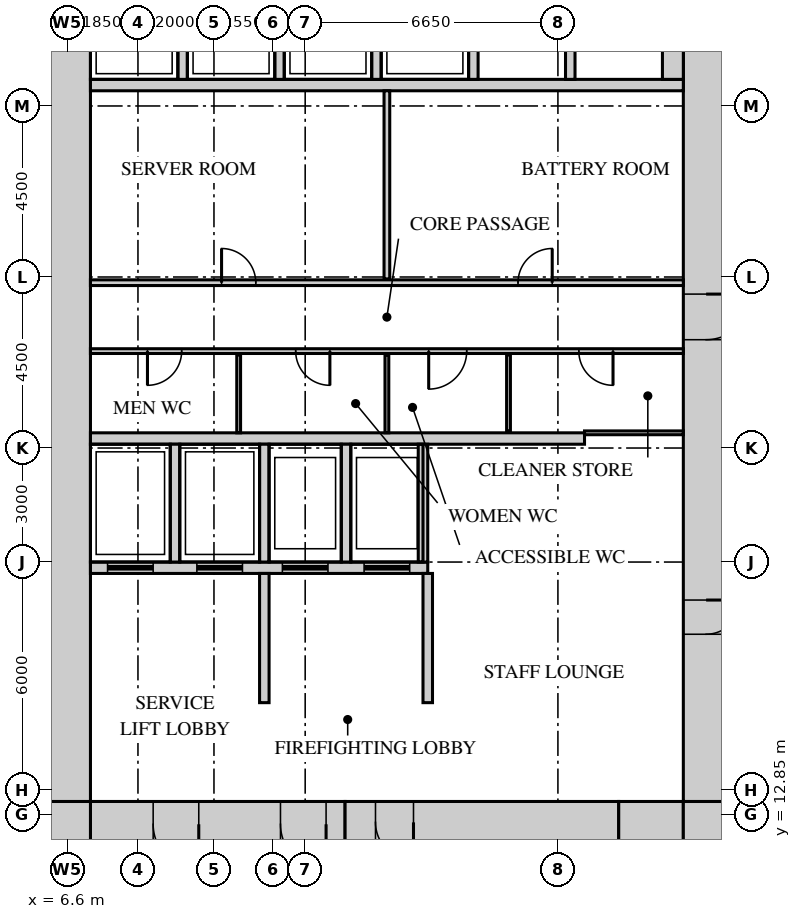
"""IFC4 building model, lengths in metres.
Left out: names, types, materials, properties, quantities, classifications, styles, units other than length and angle.
Written with IfcOpenShell. Run it as: python <this file> out.ifc"""

import sys

from ifc_helpers import new_model, si_unit, direction, frame, frame_2d, origin, place, context, subcontext, project, spatial, rectangle, extrude, source, transform, mapped, element, fill, save


model = new_model("IFC4")
c1 = context("Model", 3, precision=1e-05, world=origin(), true_north=direction((0.0, 1.0)))
c2 = subcontext(c1, "Body", "Model", "MODEL_VIEW")
j1 = project(units=[si_unit("LENGTHUNIT", "METRE"), si_unit("PLANEANGLEUNIT", "RADIAN")], contexts=[c1])
p1 = place(None, origin())
s1 = spatial("IfcSite", under=j1, at=p1, CompositionType="ELEMENT")
p2 = place(p1, origin())
s2 = spatial("IfcBuilding", under=s1, at=p2, CompositionType="ELEMENT")
p3 = place(p2, frame((0.0, 0.0, 13.0)))
s3 = spatial("IfcBuildingStorey", under=s2, at=p3, CompositionType="ELEMENT", Elevation=13.0)
m1 = source(origin(), c2, "Body", "SweptSolid", [
    extrude(rectangle(XDim=6.7, YDim=1.2, at=frame_2d((3.35, 0.0))), origin(), (0.0, 0.0, 1.0), 5.2),
])
p4 = place(p3, frame((7.2, 12.6, 0.0), z_axis=(0.0, 0.0, 1.0), x_axis=(1.0, 0.0, 0.0)))
e1 = element("IfcWall", 1, at=p4, inside=s3, PredefinedType="SHEAR", context=c2, shape_type="MappedRepresentation", body=[
    mapped(m1, transform((0.0, 0.0, 0.0))),
])
m2 = source(origin(), c2, "Body", "SweptSolid", [
    extrude(rectangle(XDim=1.2, YDim=2.1, at=frame_2d((0.6, 1.05))), frame((0.0, 0.61, 0.0), z_axis=(0.0, -1.0, 0.0), x_axis=(1.0, 0.0, 0.0)), (0.0, 0.0, 1.0), 1.22),
])
p5 = place(p4, frame((5.0, 0.0, 0.0)))
e2 = element("IfcOpeningElement", 2, at=p5, cuts=e1, PredefinedType="OPENING", context=c2, shape_type="MappedRepresentation", body=[
    mapped(m2, transform((0.0, 0.0, 0.0))),
])
p6 = place(p4, frame((1.65, 0.0, 0.0)))
e3 = element("IfcOpeningElement", 3, at=p6, cuts=e1, PredefinedType="OPENING", context=c2, shape_type="MappedRepresentation", body=[
    mapped(m2, transform((0.0, 0.0, 0.0))),
])
m3 = source(origin(), c2, "Body", "SweptSolid", [
    extrude(rectangle(XDim=7.2, YDim=1.1, at=frame_2d((3.6, 0.0))), origin(), (0.0, 0.0, 1.0), 5.2),
])
p7 = place(p3, frame((13.9, 12.65, 0.0), z_axis=(0.0, 0.0, 1.0), x_axis=(1.0, 0.0, 0.0)))
e4 = element("IfcWall", 4, at=p7, inside=s3, PredefinedType="SHEAR", context=c2, shape_type="MappedRepresentation", body=[
    mapped(m3, transform((0.0, 0.0, 0.0))),
])
m4 = source(origin(), c2, "Body", "SweptSolid", [
    extrude(rectangle(XDim=1.0, YDim=2.1, at=frame_2d((0.5, 1.05))), frame((0.0, 0.56, 0.0), z_axis=(0.0, -1.0, 0.0), x_axis=(1.0, 0.0, 0.0)), (0.0, 0.0, 1.0), 1.12),
])
p8 = place(p7, frame((0.8, 0.0, 0.0)))
e5 = element("IfcOpeningElement", 5, at=p8, cuts=e4, PredefinedType="OPENING", context=c2, shape_type="MappedRepresentation", body=[
    mapped(m4, transform((0.0, 0.0, 0.0))),
])
m5 = source(origin(), c2, "Body", "SweptSolid", [
    extrude(rectangle(XDim=1.7, YDim=1.2, at=frame_2d((0.85, 0.0))), origin(), (0.0, 0.0, 1.0), 5.2),
])
p9 = place(p3, frame((21.1, 12.6, 0.0), z_axis=(0.0, 0.0, 1.0), x_axis=(1.0, 0.0, 0.0)))
e6 = element("IfcWall", 6, at=p9, inside=s3, PredefinedType="SHEAR", context=c2, shape_type="MappedRepresentation", body=[
    mapped(m5, transform((0.0, 0.0, 0.0))),
])
m6 = source(origin(), c2, "Body", "SweptSolid", [
    extrude(rectangle(XDim=1.2, YDim=1.2, at=frame_2d((0.6, 0.0))), origin(), (0.0, 0.0, 1.0), 5.2),
])
for number, where, z_axis, x_axis in (
    (7, (22.8, 12.6, 0.0), (0.0, 0.0, 1.0), (1.0, 0.0, 0.0)),
    (8, (6.0, 12.6, 0.0), (0.0, 0.0, 1.0), (1.0, 0.0, 0.0)),
):
    element("IfcWall", number, at=place(p3, frame(where, z_axis=z_axis, x_axis=x_axis)), inside=s3, PredefinedType="SHEAR", context=c2, shape_type="MappedRepresentation", body=[
        mapped(m6, transform((0.0, 0.0, 0.0))),
    ])
m7 = source(origin(), c2, "Body", "SweptSolid", [
    extrude(rectangle(XDim=27.6, YDim=1.2, at=frame_2d((13.8, 0.0))), origin(), (0.0, 0.0, 1.0), 5.2),
])
p10 = place(p3, frame((23.4, 13.2, 0.0), z_axis=(0.0, 0.0, 1.0), x_axis=(0.0, 1.0, 0.0)))
e9 = element("IfcWall", 9, at=p10, inside=s3, PredefinedType="SHEAR", context=c2, shape_type="MappedRepresentation", body=[
    mapped(m7, transform((0.0, 0.0, 0.0))),
])
m8 = source(origin(), c2, "Body", "SweptSolid", [
    extrude(rectangle(XDim=1.8, YDim=2.1, at=frame_2d((0.9, 1.05))), frame((0.0, 0.61, 0.0), z_axis=(0.0, -1.0, 0.0), x_axis=(1.0, 0.0, 0.0)), (0.0, 0.0, 1.0), 1.22),
])
p11 = place(p10, frame((22.4, 0.0, 0.0)))
e10 = element("IfcOpeningElement", 10, at=p11, cuts=e9, PredefinedType="OPENING", context=c2, shape_type="MappedRepresentation", body=[
    mapped(m8, transform((0.0, 0.0, 0.0))),
])
p12 = place(p10, frame((12.15, 0.0, 0.0)))
e11 = element("IfcOpeningElement", 11, at=p12, cuts=e9, PredefinedType="OPENING", context=c2, shape_type="MappedRepresentation", body=[
    mapped(m2, transform((0.0, 0.0, 0.0))),
])
m9 = source(origin(), c2, "Body", "SweptSolid", [
    extrude(rectangle(XDim=0.9, YDim=2.1, at=frame_2d((0.45, 1.05))), frame((0.0, 0.61, 0.0), z_axis=(0.0, -1.0, 0.0), x_axis=(1.0, 0.0, 0.0)), (0.0, 0.0, 1.0), 1.22),
])
p13 = place(p10, frame((4.4, 0.0, 0.0)))
e12 = element("IfcOpeningElement", 12, at=p13, cuts=e9, PredefinedType="OPENING", context=c2, shape_type="MappedRepresentation", body=[
    mapped(m9, transform((0.0, 0.0, 0.0))),
])
p14 = place(p3, frame((6.6, 13.2, 0.0), z_axis=(0.0, 0.0, 1.0), x_axis=(0.0, 1.0, 0.0)))
e13 = element("IfcWall", 13, at=p14, inside=s3, PredefinedType="SHEAR", context=c2, shape_type="MappedRepresentation", body=[
    mapped(m7, transform((0.0, 0.0, 0.0))),
])
m10 = source(origin(), c2, "Body", "SweptSolid", [
    extrude(rectangle(XDim=13.0, YDim=0.3, at=frame_2d((6.5, 0.0))), origin(), (0.0, 0.0, 1.0), 5.2),
])
p15 = place(p3, frame((7.2, 22.75, 0.0), z_axis=(0.0, 0.0, 1.0), x_axis=(1.0, 0.0, 0.0)))
e14 = element("IfcWall", 14, at=p15, inside=s3, PredefinedType="STANDARD", context=c2, shape_type="MappedRepresentation", body=[
    mapped(m10, transform((0.0, 0.0, 0.0))),
])
m11 = source(origin(), c2, "Body", "SweptSolid", [
    extrude(rectangle(XDim=8.875, YDim=0.3, at=frame_2d((4.438, 0.0))), origin(), (0.0, 0.0, 1.0), 5.2),
])
p16 = place(p3, frame((7.2, 19.35, 0.0), z_axis=(0.0, 0.0, 1.0), x_axis=(1.0, 0.0, 0.0)))
e15 = element("IfcWall", 15, at=p16, inside=s3, PredefinedType="STANDARD", context=c2, shape_type="MappedRepresentation", body=[
    mapped(m11, transform((0.0, 0.0, 0.0))),
])
m12 = source(origin(), c2, "Body", "SweptSolid", [
    extrude(rectangle(XDim=1.2, YDim=2.1, at=frame_2d((0.6, 1.05))), frame((0.0, 0.16, 0.0), z_axis=(0.0, -1.0, 0.0), x_axis=(1.0, 0.0, 0.0)), (0.0, 0.0, 1.0), 0.32),
])
p17 = place(p16, frame((0.45, 0.0, 0.0)))
e16 = element("IfcOpeningElement", 16, at=p17, cuts=e15, PredefinedType="OPENING", context=c2, shape_type="MappedRepresentation", body=[
    mapped(m12, transform((0.0, 0.0, 0.0))),
])
p18 = place(p16, frame((2.8, 0.0, 0.0)))
e17 = element("IfcOpeningElement", 17, at=p18, cuts=e15, PredefinedType="OPENING", context=c2, shape_type="MappedRepresentation", body=[
    mapped(m12, transform((0.0, 0.0, 0.0))),
])
p19 = place(p16, frame((5.05, 0.0, 0.0)))
e18 = element("IfcOpeningElement", 18, at=p19, cuts=e15, PredefinedType="OPENING", context=c2, shape_type="MappedRepresentation", body=[
    mapped(m12, transform((0.0, 0.0, 0.0))),
])
p20 = place(p16, frame((7.2, 0.0, 0.0)))
e19 = element("IfcOpeningElement", 19, at=p20, cuts=e15, PredefinedType="OPENING", context=c2, shape_type="MappedRepresentation", body=[
    mapped(m12, transform((0.0, 0.0, 0.0))),
])
m13 = source(origin(), c2, "Body", "SweptSolid", [
    extrude(rectangle(XDim=15.6, YDim=0.3, at=frame_2d((7.8, 0.0))), origin(), (0.0, 0.0, 1.0), 5.2),
])
p21 = place(p3, frame((7.2, 32.05, 0.0), z_axis=(0.0, 0.0, 1.0), x_axis=(1.0, 0.0, 0.0)))
e20 = element("IfcWall", 20, at=p21, inside=s3, PredefinedType="STANDARD", context=c2, shape_type="MappedRepresentation", body=[
    mapped(m13, transform((0.0, 0.0, 0.0))),
])
m14 = source(origin(), c2, "Body", "SweptSolid", [
    extrude(rectangle(XDim=3.1, YDim=0.25, at=frame_2d((1.55, 0.0))), origin(), (0.0, 0.0, 1.0), 5.2),
])
for number, where, z_axis, x_axis in (
    (21, (9.425, 19.5, 0.0), (0.0, 0.0, 1.0), (0.0, 1.0, 0.0)),
    (22, (11.775, 19.5, 0.0), (0.0, 0.0, 1.0), (0.0, 1.0, 0.0)),
    (23, (13.925, 19.5, 0.0), (0.0, 0.0, 1.0), (0.0, 1.0, 0.0)),
    (24, (15.95, 19.5, 0.0), (0.0, 0.0, 1.0), (0.0, 1.0, 0.0)),
):
    element("IfcWall", number, at=place(p3, frame(where, z_axis=z_axis, x_axis=x_axis)), inside=s3, PredefinedType="STANDARD", context=c2, shape_type="MappedRepresentation", body=[
        mapped(m14, transform((0.0, 0.0, 0.0))),
    ])
m15 = source(origin(), c2, "Body", "SweptSolid", [
    extrude(rectangle(XDim=2.4, YDim=0.25, at=frame_2d((1.2, 0.0))), origin(), (0.0, 0.0, 1.0), 5.2),
])
for number, where, z_axis, x_axis in (
    (25, (9.625, 32.2, 0.0), (0.0, 0.0, 1.0), (0.0, 1.0, 0.0)),
    (26, (12.175, 32.2, 0.0), (0.0, 0.0, 1.0), (0.0, 1.0, 0.0)),
    (27, (14.725, 32.2, 0.0), (0.0, 0.0, 1.0), (0.0, 1.0, 0.0)),
    (28, (17.275, 32.2, 0.0), (0.0, 0.0, 1.0), (0.0, 1.0, 0.0)),
    (29, (19.825, 32.2, 0.0), (0.0, 0.0, 1.0), (0.0, 1.0, 0.0)),
):
    element("IfcWall", number, at=place(p3, frame(where, z_axis=z_axis, x_axis=x_axis)), inside=s3, PredefinedType="STANDARD", context=c2, shape_type="MappedRepresentation", body=[
        mapped(m15, transform((0.0, 0.0, 0.0))),
    ])
m16 = source(origin(), c2, "Body", "SweptSolid", [
    extrude(rectangle(XDim=2.4, YDim=0.55, at=frame_2d((1.2, 0.0))), origin(), (0.0, 0.0, 1.0), 5.2),
])
p22 = place(p3, frame((22.525, 32.2, 0.0), z_axis=(0.0, 0.0, 1.0), x_axis=(0.0, 1.0, 0.0)))
e30 = element("IfcWall", 30, at=p22, inside=s3, PredefinedType="STANDARD", context=c2, shape_type="MappedRepresentation", body=[
    mapped(m16, transform((0.0, 0.0, 0.0))),
])
m17 = source(origin(), c2, "Body", "SweptSolid", [
    extrude(rectangle(XDim=3.4, YDim=0.25, at=frame_2d((1.7, 0.0))), origin(), (0.0, 0.0, 1.0), 5.2),
])
for number, where, z_axis, x_axis in (
    (31, (16.075, 15.8, 0.0), (0.0, 0.0, 1.0), (0.0, 1.0, 0.0)),
    (32, (11.775, 15.8, 0.0), (0.0, 0.0, 1.0), (0.0, 1.0, 0.0)),
):
    element("IfcWall", number, at=place(p3, frame(where, z_axis=z_axis, x_axis=x_axis)), inside=s3, PredefinedType="STANDARD", context=c2, shape_type="MappedRepresentation", body=[
        mapped(m17, transform((0.0, 0.0, 0.0))),
    ])
m18 = source(origin(), c2, "Body", "SweptSolid", [
    extrude(rectangle(XDim=2.05, YDim=0.1, at=frame_2d((1.025, 0.0))), origin(), (0.0, 0.0, 1.0), 5.2),
])
for number, where, z_axis, x_axis in (
    (33, (11.1, 22.9, 0.0), (0.0, 0.0, 1.0), (0.0, 1.0, 0.0)),
    (34, (15.0, 22.9, 0.0), (0.0, 0.0, 1.0), (0.0, 1.0, 0.0)),
):
    element("IfcWall", number, at=place(p3, frame(where, z_axis=z_axis, x_axis=x_axis)), inside=s3, PredefinedType="PARTITIONING", context=c2, shape_type="MappedRepresentation", body=[
        mapped(m18, transform((0.0, 0.0, 0.0))),
    ])
m19 = source(origin(), c2, "Body", "SweptSolid", [
    extrude(rectangle(XDim=2.6, YDim=0.1, at=frame_2d((1.3, 0.0))), origin(), (0.0, 0.0, 1.0), 5.2),
])
p23 = place(p3, frame((20.2, 22.9, 0.0), z_axis=(0.0, 0.0, 1.0), x_axis=(1.0, 0.0, 0.0)))
e35 = element("IfcWall", 35, at=p23, inside=s3, PredefinedType="PARTITIONING", context=c2, shape_type="MappedRepresentation", body=[
    mapped(m19, transform((0.0, 0.0, 0.0))),
])
m20 = source(origin(), c2, "Body", "SweptSolid", [
    extrude(rectangle(XDim=2.0, YDim=0.1, at=frame_2d((1.0, 0.0))), origin(), (0.0, 0.0, 1.0), 5.2),
])
p24 = place(p3, frame((18.2, 22.95, 0.0), z_axis=(0.0, 0.0, 1.0), x_axis=(0.0, 1.0, 0.0)))
e36 = element("IfcWall", 36, at=p24, inside=s3, PredefinedType="PARTITIONING", context=c2, shape_type="MappedRepresentation", body=[
    mapped(m20, transform((0.0, 0.0, 0.0))),
])
m21 = source(origin(), c2, "Body", "SweptSolid", [
    extrude(rectangle(XDim=15.6, YDim=0.125, at=frame_2d((7.8, 0.0))), origin(), (0.0, 0.0, 1.0), 5.2),
])
p25 = place(p3, frame((7.2, 25.05, 0.0), z_axis=(0.0, 0.0, 1.0), x_axis=(1.0, 0.0, 0.0)))
e37 = element("IfcWall", 37, at=p25, inside=s3, PredefinedType="PARTITIONING", context=c2, shape_type="MappedRepresentation", body=[
    mapped(m21, transform((0.0, 0.0, 0.0))),
])
m22 = source(origin(), c2, "Body", "SweptSolid", [
    extrude(rectangle(XDim=0.9, YDim=2.1, at=frame_2d((0.45, 1.05))), frame((0.0, 0.073, 0.0), z_axis=(0.0, -1.0, 0.0), x_axis=(1.0, 0.0, 0.0)), (0.0, 0.0, 1.0), 0.145),
])
p26 = place(p25, frame((1.5, 0.0, 0.0)))
e38 = element("IfcOpeningElement", 38, at=p26, cuts=e37, PredefinedType="OPENING", context=c2, shape_type="MappedRepresentation", body=[
    mapped(m22, transform((0.0, 0.0, 0.0))),
])
p27 = place(p25, frame((5.4, 0.0, 0.0)))
e39 = element("IfcOpeningElement", 39, at=p27, cuts=e37, PredefinedType="OPENING", context=c2, shape_type="MappedRepresentation", body=[
    mapped(m22, transform((0.0, 0.0, 0.0))),
])
m23 = source(origin(), c2, "Body", "SweptSolid", [
    extrude(rectangle(XDim=1.0, YDim=2.1, at=frame_2d((0.5, 1.05))), frame((0.0, 0.073, 0.0), z_axis=(0.0, -1.0, 0.0), x_axis=(1.0, 0.0, 0.0)), (0.0, 0.0, 1.0), 0.145),
])
p28 = place(p25, frame((8.9, 0.0, 0.0)))
e40 = element("IfcOpeningElement", 40, at=p28, cuts=e37, PredefinedType="OPENING", context=c2, shape_type="MappedRepresentation", body=[
    mapped(m23, transform((0.0, 0.0, 0.0))),
])
p29 = place(p25, frame((12.85, 0.0, 0.0)))
e41 = element("IfcOpeningElement", 41, at=p29, cuts=e37, PredefinedType="OPENING", context=c2, shape_type="MappedRepresentation", body=[
    mapped(m22, transform((0.0, 0.0, 0.0))),
])
m24 = source(origin(), c2, "Body", "SweptSolid", [
    extrude(rectangle(XDim=15.6, YDim=0.15, at=frame_2d((7.8, 0.0))), origin(), (0.0, 0.0, 1.0), 5.2),
])
p30 = place(p3, frame((7.2, 26.85, 0.0), z_axis=(0.0, 0.0, 1.0), x_axis=(1.0, 0.0, 0.0)))
e42 = element("IfcWall", 42, at=p30, inside=s3, PredefinedType="PARTITIONING", context=c2, shape_type="MappedRepresentation", body=[
    mapped(m24, transform((0.0, 0.0, 0.0))),
])
m25 = source(origin(), c2, "Body", "SweptSolid", [
    extrude(rectangle(XDim=0.9, YDim=2.1, at=frame_2d((0.45, 1.05))), frame((0.0, 0.085, 0.0), z_axis=(0.0, -1.0, 0.0), x_axis=(1.0, 0.0, 0.0)), (0.0, 0.0, 1.0), 0.17),
])
p31 = place(p30, frame((3.45, 0.0, 0.0)))
e43 = element("IfcOpeningElement", 43, at=p31, cuts=e42, PredefinedType="OPENING", context=c2, shape_type="MappedRepresentation", body=[
    mapped(m25, transform((0.0, 0.0, 0.0))),
])
p32 = place(p30, frame((11.25, 0.0, 0.0)))
e44 = element("IfcOpeningElement", 44, at=p32, cuts=e42, PredefinedType="OPENING", context=c2, shape_type="MappedRepresentation", body=[
    mapped(m25, transform((0.0, 0.0, 0.0))),
])
m26 = source(origin(), c2, "Body", "SweptSolid", [
    extrude(rectangle(XDim=4.95, YDim=0.15, at=frame_2d((2.475, 0.0))), origin(), (0.0, 0.0, 1.0), 5.2),
])
p33 = place(p3, frame((15.0, 26.95, 0.0), z_axis=(0.0, 0.0, 1.0), x_axis=(0.0, 1.0, 0.0)))
e45 = element("IfcWall", 45, at=p33, inside=s3, PredefinedType="PARTITIONING", context=c2, shape_type="MappedRepresentation", body=[
    mapped(m26, transform((0.0, 0.0, 0.0))),
])
m27 = source(origin(), c2, "Body", "SweptSolid", [
    extrude(rectangle(XDim=1.2, YDim=2.1, at=frame_2d((0.6, 1.05))), frame((0.0, 0.55, 0.0), z_axis=(0.0, -1.0, 0.0), x_axis=(1.0, 0.0, 0.0)), (0.0, 0.0, 1.0), 1.1),
])
p34 = place(p12, origin())
e46 = element("IfcDoor", 46, at=p34, inside=s3, OperationType="SINGLE_SWING_RIGHT", PredefinedType="DOOR", context=c2, shape_type="MappedRepresentation", body=[
    mapped(m27, transform((0.0, 0.0, 0.0))),
])
fill(e11, e46)
m28 = source(origin(), c2, "Body", "SweptSolid", [
    extrude(rectangle(XDim=0.9, YDim=2.1, at=frame_2d((0.45, 1.05))), frame((0.0, 0.025, 0.0), z_axis=(0.0, -1.0, 0.0), x_axis=(1.0, 0.0, 0.0)), (0.0, 0.0, 1.0), 0.05),
])
p35 = place(p31, origin())
e47 = element("IfcDoor", 47, at=p35, inside=s3, OperationType="SINGLE_SWING_RIGHT", PredefinedType="DOOR", context=c2, shape_type="MappedRepresentation", body=[
    mapped(m28, transform((0.0, 0.0, 0.0))),
])
fill(e43, e47)
p36 = place(p32, origin())
e48 = element("IfcDoor", 48, at=p36, inside=s3, OperationType="SINGLE_SWING_LEFT", PredefinedType="DOOR", context=c2, shape_type="MappedRepresentation", body=[
    mapped(m28, transform((0.0, 0.0, 0.0))),
])
fill(e44, e48)
p37 = place(p26, origin())
e49 = element("IfcDoor", 49, at=p37, inside=s3, OperationType="SINGLE_SWING_LEFT", PredefinedType="DOOR", context=c2, shape_type="MappedRepresentation", body=[
    mapped(m28, transform((0.0, 0.0, 0.0))),
])
fill(e38, e49)
p38 = place(p27, origin())
e50 = element("IfcDoor", 50, at=p38, inside=s3, OperationType="SINGLE_SWING_RIGHT", PredefinedType="DOOR", context=c2, shape_type="MappedRepresentation", body=[
    mapped(m28, transform((0.0, 0.0, 0.0))),
])
fill(e39, e50)
m29 = source(origin(), c2, "Body", "SweptSolid", [
    extrude(rectangle(XDim=1.0, YDim=2.1, at=frame_2d((0.5, 1.05))), frame((0.0, 0.025, 0.0), z_axis=(0.0, -1.0, 0.0), x_axis=(1.0, 0.0, 0.0)), (0.0, 0.0, 1.0), 0.05),
])
p39 = place(p28, origin())
e51 = element("IfcDoor", 51, at=p39, inside=s3, OperationType="SINGLE_SWING_LEFT", PredefinedType="DOOR", context=c2, shape_type="MappedRepresentation", body=[
    mapped(m29, transform((0.0, 0.0, 0.0))),
])
fill(e40, e51)
p40 = place(p29, origin())
e52 = element("IfcDoor", 52, at=p40, inside=s3, OperationType="SINGLE_SWING_RIGHT", PredefinedType="DOOR", context=c2, shape_type="MappedRepresentation", body=[
    mapped(m28, transform((0.0, 0.0, 0.0))),
])
fill(e41, e52)
m30 = source(origin(), c2, "Body", "SweptSolid", [
    extrude(rectangle(XDim=0.9, YDim=2.1, at=frame_2d((0.45, 1.05))), frame((0.0, 0.55, 0.0), z_axis=(0.0, -1.0, 0.0), x_axis=(1.0, 0.0, 0.0)), (0.0, 0.0, 1.0), 1.1),
])
p41 = place(p13, origin())
e53 = element("IfcDoor", 53, at=p41, inside=s3, OperationType="SINGLE_SWING_RIGHT", PredefinedType="DOOR", context=c2, shape_type="MappedRepresentation", body=[
    mapped(m30, transform((0.0, 0.0, 0.0))),
])
fill(e12, e53)
p42 = place(p5, origin())
e54 = element("IfcDoor", 54, at=p42, inside=s3, OperationType="SINGLE_SWING_RIGHT", PredefinedType="DOOR", context=c2, shape_type="MappedRepresentation", body=[
    mapped(m27, transform((0.0, 0.0, 0.0))),
])
fill(e2, e54)
p43 = place(p6, origin())
e55 = element("IfcDoor", 55, at=p43, inside=s3, OperationType="SINGLE_SWING_RIGHT", PredefinedType="DOOR", context=c2, shape_type="MappedRepresentation", body=[
    mapped(m27, transform((0.0, 0.0, 0.0))),
])
fill(e3, e55)
m31 = source(origin(), c2, "Body", "SweptSolid", [
    extrude(rectangle(XDim=1.0, YDim=2.1, at=frame_2d((0.5, 1.05))), frame((0.0, 0.5, 0.0), z_axis=(0.0, -1.0, 0.0), x_axis=(1.0, 0.0, 0.0)), (0.0, 0.0, 1.0), 1.0),
])
p44 = place(p8, origin())
e56 = element("IfcDoor", 56, at=p44, inside=s3, OperationType="SINGLE_SWING_RIGHT", PredefinedType="DOOR", context=c2, shape_type="MappedRepresentation", body=[
    mapped(m31, transform((0.0, 0.0, 0.0))),
])
fill(e5, e56)
m32 = source(origin(), c2, "Body", "SweptSolid", [
    extrude(rectangle(XDim=1.2, YDim=2.1, at=frame_2d((0.6, 1.05))), frame((0.0, 0.025, 0.0), z_axis=(0.0, -1.0, 0.0), x_axis=(1.0, 0.0, 0.0)), (0.0, 0.0, 1.0), 0.05),
])
p45 = place(p17, origin())
e57 = element("IfcDoor", 57, at=p45, inside=s3, OperationType="DOUBLE_DOOR_SLIDING", PredefinedType="DOOR", context=c2, shape_type="MappedRepresentation", body=[
    mapped(m32, transform((0.0, 0.0, 0.0))),
])
fill(e16, e57)
p46 = place(p18, origin())
e58 = element("IfcDoor", 58, at=p46, inside=s3, OperationType="DOUBLE_DOOR_SLIDING", PredefinedType="DOOR", context=c2, shape_type="MappedRepresentation", body=[
    mapped(m32, transform((0.0, 0.0, 0.0))),
])
fill(e17, e58)
p47 = place(p19, origin())
e59 = element("IfcDoor", 59, at=p47, inside=s3, OperationType="DOUBLE_DOOR_SLIDING", PredefinedType="DOOR", context=c2, shape_type="MappedRepresentation", body=[
    mapped(m32, transform((0.0, 0.0, 0.0))),
])
fill(e18, e59)
p48 = place(p20, origin())
e60 = element("IfcDoor", 60, at=p48, inside=s3, OperationType="DOUBLE_DOOR_SLIDING", PredefinedType="DOOR", context=c2, shape_type="MappedRepresentation", body=[
    mapped(m32, transform((0.0, 0.0, 0.0))),
])
fill(e19, e60)
save(model, sys.argv[1])
